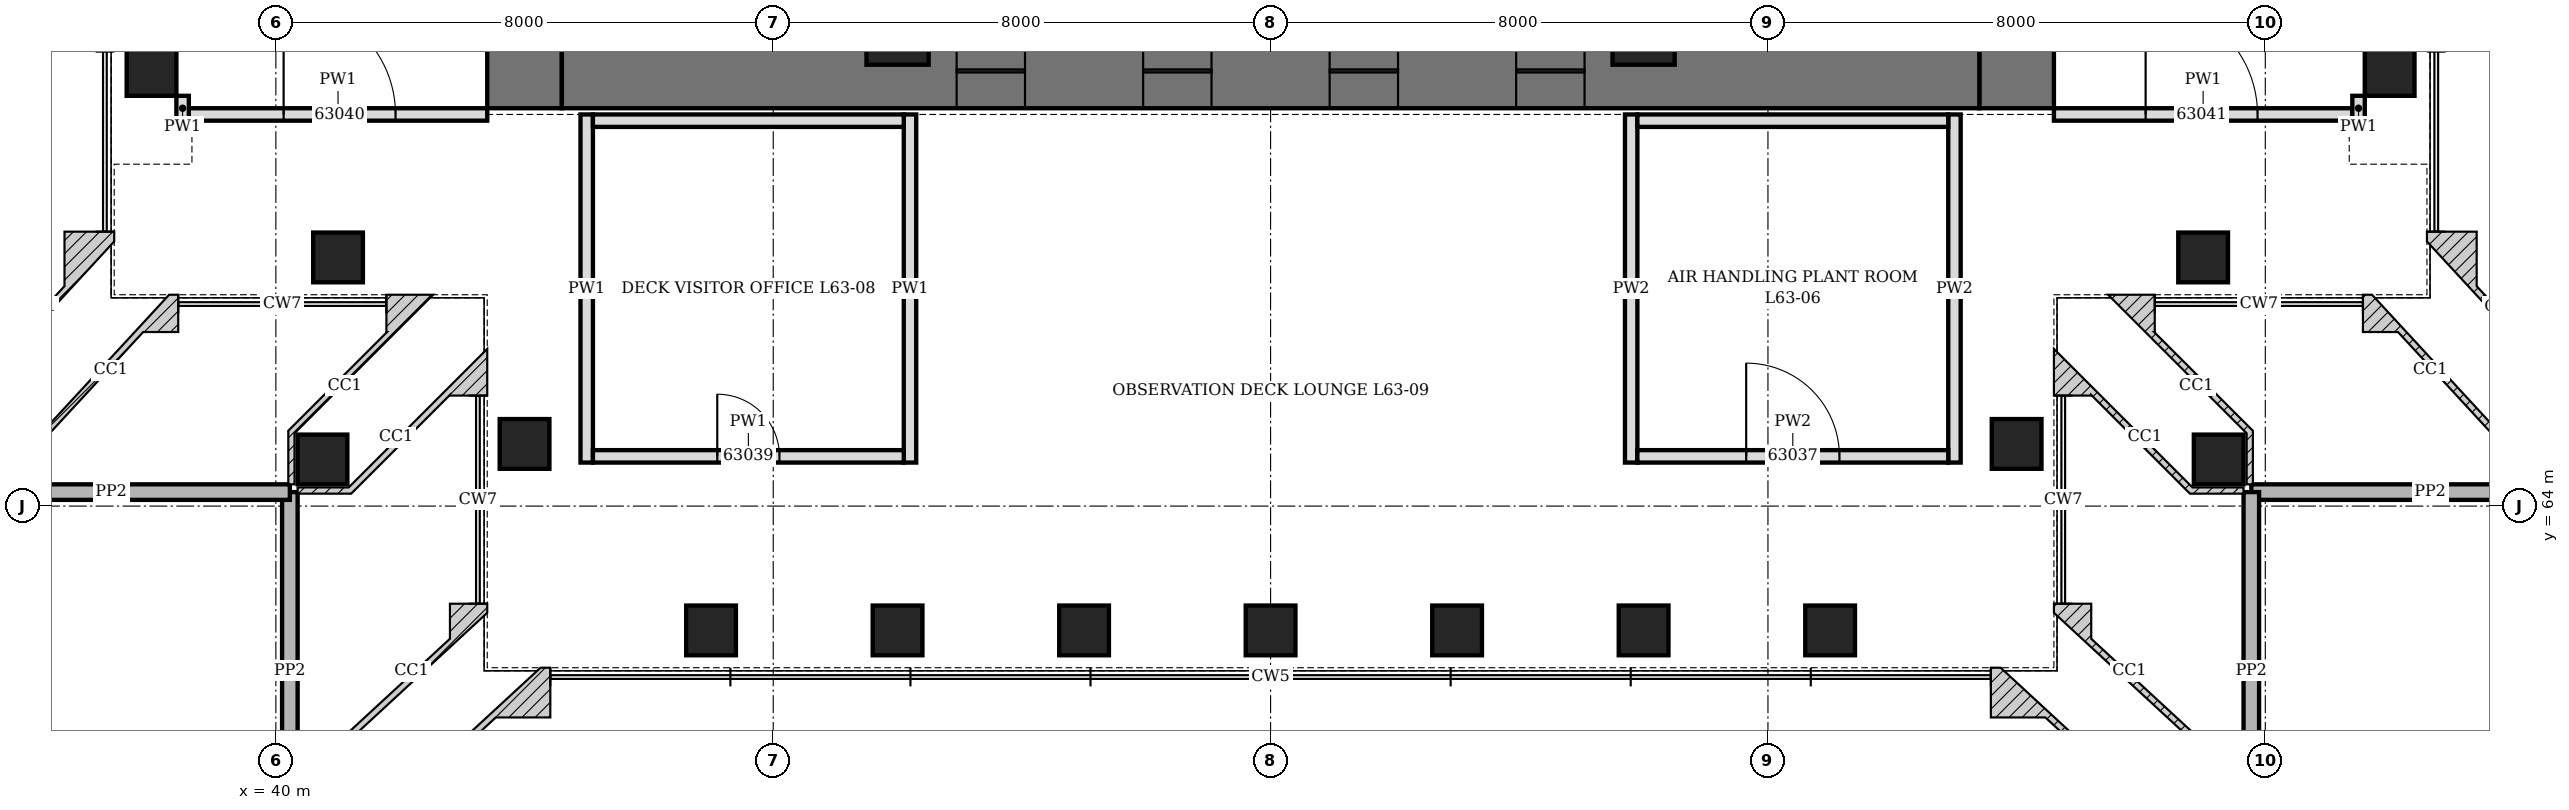
"""IFC4 building model, lengths in metres.
Left out: names, types, materials, properties, quantities, classifications, styles, units other than length and angle.
Written with IfcOpenShell. Run it as: python <this file> out.ifc"""

import sys

from ifc_helpers import new_model, si_unit, direction, frame, frame_2d, origin, origin_2d, place, context, subcontext, project, spatial, rectangle, hollow_rectangle, extrude, clip, halfspace, element, fill, save


model = new_model("IFC4")
c1 = context("Model", 3, precision=1e-05, world=origin(), true_north=direction((0.0, 1.0)))
c2 = subcontext(c1, "Body", "Model", "MODEL_VIEW")
j1 = project(units=[si_unit("LENGTHUNIT", "METRE"), si_unit("PLANEANGLEUNIT", "RADIAN")], contexts=[c1])
p1 = place(None, origin())
s1 = spatial("IfcSite", under=j1, at=p1, CompositionType="ELEMENT")
p2 = place(p1, origin())
s2 = spatial("IfcBuilding", under=s1, at=p2, CompositionType="ELEMENT")
p3 = place(p2, frame((0.0, 0.0, 279.7)))
s3 = spatial("IfcBuildingStorey", under=s2, at=p3, CompositionType="ELEMENT", Elevation=279.7)
p4 = place(p3, frame((40.75, 59.0, -0.25), z_axis=(0.424465046491, 0.391813889069, 0.81627893556), x_axis=(-0.678280102733, 0.734803444627, 0.0)))
e1 = element("IfcColumn", 1, at=p4, inside=s3, PredefinedType="COLUMN", context=c2, shape_type="Clipping", body=[
    clip(clip(extrude(hollow_rectangle(XDim=0.8, YDim=0.8, WallThickness=0.1, at=origin_2d()), origin(), (0.0, 0.0, 1.0), 7.657), halfspace(frame((0.0, 0.0, 0.285), z_axis=(0.0, 0.0, 1.0), x_axis=(1.0, 0.0, 0.0)), True)), halfspace(frame((0.0, 0.0, 7.371), z_axis=(0.0, 0.0, -1.0), x_axis=(1.0, 0.0, 0.0)), True)),
])
for number, where, z_axis, x_axis in (
    (2, (47.0, 62.0, -0.25), (0.0, 0.0, 1.0), (1.0, 0.0, 0.0)),
    (3, (50.0, 62.0, -0.25), (0.0, 0.0, 1.0), (1.0, 0.0, 0.0)),
    (4, (53.0, 62.0, -0.25), (0.0, 0.0, 1.0), (1.0, 0.0, 0.0)),
    (5, (56.0, 62.0, -0.25), (0.0, 0.0, 1.0), (1.0, 0.0, 0.0)),
    (6, (59.0, 62.0, -0.25), (0.0, 0.0, 1.0), (1.0, 0.0, 0.0)),
    (7, (62.0, 62.0, -0.25), (0.0, 0.0, 1.0), (1.0, 0.0, 0.0)),
    (8, (65.0, 62.0, -0.25), (0.0, 0.0, 1.0), (1.0, 0.0, 0.0)),
):
    element("IfcColumn", number, at=place(p3, frame(where, z_axis=z_axis, x_axis=x_axis)), inside=s3, PredefinedType="COLUMN", context=c2, shape_type="SweptSolid", body=[
        extrude(hollow_rectangle(XDim=0.8, YDim=0.8, WallThickness=0.1, at=origin_2d()), origin(), (0.0, 0.0, 1.0), 6.25),
    ])
p5 = place(p3, frame((71.25, 59.0, -0.25), z_axis=(-0.424465046491, 0.391813889069, 0.81627893556), x_axis=(-0.678280102733, -0.734803444627, 0.0)))
e9 = element("IfcColumn", 9, at=p5, inside=s3, PredefinedType="COLUMN", context=c2, shape_type="Clipping", body=[
    clip(clip(extrude(hollow_rectangle(XDim=0.8, YDim=0.8, WallThickness=0.1, at=origin_2d()), origin(), (0.0, 0.0, 1.0), 7.657), halfspace(frame((0.0, 0.0, 0.285), z_axis=(0.0, 0.0, 1.0), x_axis=(1.0, 0.0, 0.0)), True)), halfspace(frame((0.0, 0.0, 7.371), z_axis=(0.0, 0.0, -1.0), x_axis=(1.0, 0.0, 0.0)), True)),
])
p6 = place(p3, frame((68.0, 65.0, -0.25), z_axis=(0.0, 0.0, 1.0), x_axis=(0.0, 1.0, 0.0)))
e10 = element("IfcColumn", 10, at=p6, inside=s3, PredefinedType="COLUMN", context=c2, shape_type="SweptSolid", body=[
    extrude(hollow_rectangle(XDim=0.8, YDim=0.8, WallThickness=0.1, at=origin_2d()), origin(), (0.0, 0.0, 1.0), 6.25),
])
p7 = place(p3, frame((71.25, 64.75, -0.25), z_axis=(-0.418919145253, 0.418919145253, 0.805613740871), x_axis=(-0.707106781187, -0.707106781187, 0.0)))
e11 = element("IfcColumn", 11, at=p7, inside=s3, PredefinedType="COLUMN", context=c2, shape_type="Clipping", body=[
    clip(clip(extrude(hollow_rectangle(XDim=0.8, YDim=0.8, WallThickness=0.1, at=origin_2d()), origin(), (0.0, 0.0, 1.0), 7.758), halfspace(frame((0.0, 0.0, 0.297), z_axis=(0.0, 0.0, 1.0), x_axis=(1.0, 0.0, 0.0)), True)), halfspace(frame((0.0, 0.0, 7.461), z_axis=(0.0, 0.0, -1.0), x_axis=(1.0, 0.0, 0.0)), True)),
])
p8 = place(p3, frame((71.0, 68.0, -0.25), z_axis=(0.0, 0.0, 1.0), x_axis=(1.0, 0.0, 0.0)))
e12 = element("IfcColumn", 12, at=p8, inside=s3, PredefinedType="COLUMN", context=c2, shape_type="SweptSolid", body=[
    extrude(hollow_rectangle(XDim=0.8, YDim=0.8, WallThickness=0.1, at=origin_2d()), origin(), (0.0, 0.0, 1.0), 6.25),
])
p9 = place(p3, frame((77.0, 64.75, -0.25), z_axis=(-0.391813889069, 0.424465046491, 0.81627893556), x_axis=(-0.734803444627, -0.678280102733, 0.0)))
e13 = element("IfcColumn", 13, at=p9, inside=s3, PredefinedType="COLUMN", context=c2, shape_type="Clipping", body=[
    clip(clip(extrude(hollow_rectangle(XDim=0.8, YDim=0.8, WallThickness=0.1, at=origin_2d()), origin(), (0.0, 0.0, 1.0), 7.657), halfspace(frame((0.0, 0.0, 0.285), z_axis=(0.0, 0.0, 1.0), x_axis=(1.0, 0.0, 0.0)), True)), halfspace(frame((0.0, 0.0, 7.371), z_axis=(0.0, 0.0, -1.0), x_axis=(1.0, 0.0, 0.0)), True)),
])
for number, where, z_axis, x_axis in (
    (14, (74.0, 71.0, -0.25), (0.0, 0.0, 1.0), (0.0, 1.0, 0.0)),
    (15, (38.0, 71.0, -0.25), (0.0, 0.0, 1.0), (0.0, 1.0, 0.0)),
):
    element("IfcColumn", number, at=place(p3, frame(where, z_axis=z_axis, x_axis=x_axis)), inside=s3, PredefinedType="COLUMN", context=c2, shape_type="SweptSolid", body=[
        extrude(hollow_rectangle(XDim=0.8, YDim=0.8, WallThickness=0.1, at=origin_2d()), origin(), (0.0, 0.0, 1.0), 6.25),
    ])
p10 = place(p3, frame((35.0, 64.75, -0.25), z_axis=(0.391813889069, 0.424465046491, 0.81627893556), x_axis=(-0.734803444627, 0.678280102733, 0.0)))
e16 = element("IfcColumn", 16, at=p10, inside=s3, PredefinedType="COLUMN", context=c2, shape_type="Clipping", body=[
    clip(clip(extrude(hollow_rectangle(XDim=0.8, YDim=0.8, WallThickness=0.1, at=origin_2d()), origin(), (0.0, 0.0, 1.0), 7.657), halfspace(frame((0.0, 0.0, 0.285), z_axis=(0.0, 0.0, 1.0), x_axis=(1.0, 0.0, 0.0)), True)), halfspace(frame((0.0, 0.0, 7.371), z_axis=(0.0, 0.0, -1.0), x_axis=(1.0, 0.0, 0.0)), True)),
])
p11 = place(p3, frame((41.0, 68.0, -0.25), z_axis=(0.0, 0.0, 1.0), x_axis=(1.0, 0.0, 0.0)))
e17 = element("IfcColumn", 17, at=p11, inside=s3, PredefinedType="COLUMN", context=c2, shape_type="SweptSolid", body=[
    extrude(hollow_rectangle(XDim=0.8, YDim=0.8, WallThickness=0.1, at=origin_2d()), origin(), (0.0, 0.0, 1.0), 6.25),
])
p12 = place(p3, frame((40.75, 64.75, -0.25), z_axis=(0.418919145253, 0.418919145253, 0.805613740871), x_axis=(-0.707106781187, 0.707106781187, 0.0)))
e18 = element("IfcColumn", 18, at=p12, inside=s3, PredefinedType="COLUMN", context=c2, shape_type="Clipping", body=[
    clip(clip(extrude(hollow_rectangle(XDim=0.8, YDim=0.8, WallThickness=0.1, at=origin_2d()), origin(), (0.0, 0.0, 1.0), 7.758), halfspace(frame((0.0, 0.0, 0.297), z_axis=(0.0, 0.0, 1.0), x_axis=(1.0, 0.0, 0.0)), True)), halfspace(frame((0.0, 0.0, 7.461), z_axis=(0.0, 0.0, -1.0), x_axis=(1.0, 0.0, 0.0)), True)),
])
p13 = place(p3, frame((44.0, 65.0, -0.25), z_axis=(0.0, 0.0, 1.0), x_axis=(0.0, 1.0, 0.0)))
e19 = element("IfcColumn", 19, at=p13, inside=s3, PredefinedType="COLUMN", context=c2, shape_type="SweptSolid", body=[
    extrude(hollow_rectangle(XDim=0.8, YDim=0.8, WallThickness=0.1, at=origin_2d()), origin(), (0.0, 0.0, 1.0), 6.25),
])
p14 = place(p3, frame((44.0, 70.4, 0.0), z_axis=(0.0, 0.0, 1.0), x_axis=(0.0, 1.0, 0.0)))
e20 = element("IfcWall", 20, at=p14, inside=s3, PredefinedType="SHEAR", context=c2, shape_type="SweptSolid", body=[
    extrude(rectangle(XDim=19.2, YDim=1.2, at=frame_2d((9.6, 0.0))), origin(), (0.0, 0.0, 1.0), 6.0),
])
p15 = place(p14, frame((8.6, 0.0, 0.0)))
e21 = element("IfcOpeningElement", 21, at=p15, cuts=e20, PredefinedType="OPENING", context=c2, shape_type="SweptSolid", body=[
    extrude(rectangle(XDim=2.0, YDim=2.4, at=frame_2d((1.0, 1.2))), frame((0.0, 0.61, 0.0), z_axis=(0.0, -1.0, 0.0), x_axis=(1.0, 0.0, 0.0)), (0.0, 0.0, 1.0), 1.22),
])
p16 = place(p3, frame((68.0, 70.4, 0.0), z_axis=(0.0, 0.0, 1.0), x_axis=(0.0, 1.0, 0.0)))
e22 = element("IfcWall", 22, at=p16, inside=s3, PredefinedType="SHEAR", context=c2, shape_type="SweptSolid", body=[
    extrude(rectangle(XDim=19.2, YDim=1.2, at=frame_2d((9.6, 0.0))), origin(), (0.0, 0.0, 1.0), 6.0),
])
p17 = place(p16, frame((8.6, 0.0, 0.0)))
e23 = element("IfcOpeningElement", 23, at=p17, cuts=e22, PredefinedType="OPENING", context=c2, shape_type="SweptSolid", body=[
    extrude(rectangle(XDim=2.0, YDim=2.4, at=frame_2d((1.0, 1.2))), frame((0.0, 0.61, 0.0), z_axis=(0.0, -1.0, 0.0), x_axis=(1.0, 0.0, 0.0)), (0.0, 0.0, 1.0), 1.22),
])
p18 = place(p3, frame((44.6, 71.0, 0.0), z_axis=(0.0, 0.0, 1.0), x_axis=(1.0, 0.0, 0.0)))
e24 = element("IfcWall", 24, at=p18, inside=s3, PredefinedType="SHEAR", context=c2, shape_type="SweptSolid", body=[
    extrude(rectangle(XDim=22.8, YDim=1.2, at=frame_2d((11.4, 0.0))), origin(), (0.0, 0.0, 1.0), 6.0),
])
p19 = place(p18, frame((6.35, 0.0, 0.0)))
e25 = element("IfcOpeningElement", 25, at=p19, cuts=e24, PredefinedType="OPENING", context=c2, shape_type="SweptSolid", body=[
    extrude(rectangle(XDim=1.1, YDim=2.2, at=frame_2d((0.55, 1.1))), frame((0.0, 0.61, 0.0), z_axis=(0.0, -1.0, 0.0), x_axis=(1.0, 0.0, 0.0)), (0.0, 0.0, 1.0), 1.22),
])
p20 = place(p18, frame((9.35, 0.0, 0.0)))
e26 = element("IfcOpeningElement", 26, at=p20, cuts=e24, PredefinedType="OPENING", context=c2, shape_type="SweptSolid", body=[
    extrude(rectangle(XDim=1.1, YDim=2.2, at=frame_2d((0.55, 1.1))), frame((0.0, 0.61, 0.0), z_axis=(0.0, -1.0, 0.0), x_axis=(1.0, 0.0, 0.0)), (0.0, 0.0, 1.0), 1.22),
])
p21 = place(p18, frame((12.35, 0.0, 0.0)))
e27 = element("IfcOpeningElement", 27, at=p21, cuts=e24, PredefinedType="OPENING", context=c2, shape_type="SweptSolid", body=[
    extrude(rectangle(XDim=1.1, YDim=2.2, at=frame_2d((0.55, 1.1))), frame((0.0, 0.61, 0.0), z_axis=(0.0, -1.0, 0.0), x_axis=(1.0, 0.0, 0.0)), (0.0, 0.0, 1.0), 1.22),
])
p22 = place(p18, frame((15.35, 0.0, 0.0)))
e28 = element("IfcOpeningElement", 28, at=p22, cuts=e24, PredefinedType="OPENING", context=c2, shape_type="SweptSolid", body=[
    extrude(rectangle(XDim=1.1, YDim=2.2, at=frame_2d((0.55, 1.1))), frame((0.0, 0.61, 0.0), z_axis=(0.0, -1.0, 0.0), x_axis=(1.0, 0.0, 0.0)), (0.0, 0.0, 1.0), 1.22),
])
for number, where, z_axis, x_axis in (
    (29, (50.0, 71.6, 0.0), (0.0, 0.0, 1.0), (1.0, 0.0, 0.0)),
    (30, (62.0, 71.6, 0.0), (0.0, 0.0, 1.0), (1.0, 0.0, 0.0)),
):
    element("IfcColumn", number, at=place(p3, frame(where, z_axis=z_axis, x_axis=x_axis)), inside=s3, PredefinedType="COLUMN", context=c2, shape_type="SweptSolid", body=[
        extrude(hollow_rectangle(XDim=1.0, YDim=1.0, WallThickness=0.15, at=origin_2d()), origin(), (0.0, 0.0, 1.0), 6.0),
    ])
for number, where, z_axis, x_axis in (
    (31, (40.225, 58.475, 0.0), (0.0, 0.0, 1.0), (0.0, 1.0, 0.0)),
    (32, (40.225, 64.225, 0.0), (0.0, 0.0, 1.0), (-1.0, 0.0, 0.0)),
    (33, (77.525, 64.225, 0.0), (0.0, 0.0, 1.0), (-1.0, 0.0, 0.0)),
    (34, (71.775, 64.225, 0.0), (0.0, 0.0, 1.0), (0.0, -1.0, 0.0)),
):
    element("IfcWall", number, at=place(p3, frame(where, z_axis=z_axis, x_axis=x_axis)), inside=s3, PredefinedType="PARAPET", context=c2, shape_type="SweptSolid", body=[
        extrude(rectangle(XDim=5.75, YDim=0.25, at=frame_2d((2.875, 0.0))), origin(), (0.0, 0.0, 1.0), 1.1),
    ])
for number, where, z_axis, x_axis in (
    (35, (61.8, 64.7, 0.0), (0.0, 0.0, 1.0), (0.0, 1.0, 0.0)),
    (36, (67.0, 64.7, 0.0), (0.0, 0.0, 1.0), (0.0, 1.0, 0.0)),
):
    element("IfcWall", number, at=place(p3, frame(where, z_axis=z_axis, x_axis=x_axis)), inside=s3, PredefinedType="PARTITIONING", context=c2, shape_type="SweptSolid", body=[
        extrude(rectangle(XDim=5.6, YDim=0.2, at=frame_2d((2.8, 0.0))), origin(), (0.0, 0.0, 1.0), 5.75),
    ])
p23 = place(p3, frame((61.9, 64.8, 0.0), z_axis=(0.0, 0.0, 1.0), x_axis=(1.0, 0.0, 0.0)))
e37 = element("IfcWall", 37, at=p23, inside=s3, PredefinedType="PARTITIONING", context=c2, shape_type="SweptSolid", body=[
    extrude(rectangle(XDim=5.0, YDim=0.2, at=frame_2d((2.5, 0.0))), origin(), (0.0, 0.0, 1.0), 5.75),
])
p24 = place(p23, frame((1.75, 0.0, 0.0)))
e38 = element("IfcOpeningElement", 38, at=p24, cuts=e37, PredefinedType="OPENING", context=c2, shape_type="SweptSolid", body=[
    extrude(rectangle(XDim=1.5, YDim=2.4, at=frame_2d((0.75, 1.2))), frame((0.0, 0.11, 0.0), z_axis=(0.0, -1.0, 0.0), x_axis=(1.0, 0.0, 0.0)), (0.0, 0.0, 1.0), 0.22),
])
p25 = place(p3, frame((61.9, 70.2, 0.0), z_axis=(0.0, 0.0, 1.0), x_axis=(1.0, 0.0, 0.0)))
e39 = element("IfcWall", 39, at=p25, inside=s3, PredefinedType="PARTITIONING", context=c2, shape_type="SweptSolid", body=[
    extrude(rectangle(XDim=5.0, YDim=0.2, at=frame_2d((2.5, 0.0))), origin(), (0.0, 0.0, 1.0), 5.75),
])
for number, where, z_axis, x_axis in (
    (40, (45.0, 64.7, 0.0), (0.0, 0.0, 1.0), (0.0, 1.0, 0.0)),
    (41, (50.2, 64.7, 0.0), (0.0, 0.0, 1.0), (0.0, 1.0, 0.0)),
):
    element("IfcWall", number, at=place(p3, frame(where, z_axis=z_axis, x_axis=x_axis)), inside=s3, PredefinedType="PARTITIONING", context=c2, shape_type="SweptSolid", body=[
        extrude(rectangle(XDim=5.6, YDim=0.2, at=frame_2d((2.8, 0.0))), origin(), (0.0, 0.0, 1.0), 5.75),
    ])
p26 = place(p3, frame((45.1, 64.8, 0.0), z_axis=(0.0, 0.0, 1.0), x_axis=(1.0, 0.0, 0.0)))
e42 = element("IfcWall", 42, at=p26, inside=s3, PredefinedType="PARTITIONING", context=c2, shape_type="SweptSolid", body=[
    extrude(rectangle(XDim=5.0, YDim=0.2, at=frame_2d((2.5, 0.0))), origin(), (0.0, 0.0, 1.0), 5.75),
])
p27 = place(p26, frame((2.0, 0.0, 0.0)))
e43 = element("IfcOpeningElement", 43, at=p27, cuts=e42, PredefinedType="OPENING", context=c2, shape_type="SweptSolid", body=[
    extrude(rectangle(XDim=1.0, YDim=2.1, at=frame_2d((0.5, 1.05))), frame((0.0, 0.11, 0.0), z_axis=(0.0, -1.0, 0.0), x_axis=(1.0, 0.0, 0.0)), (0.0, 0.0, 1.0), 0.22),
])
p28 = place(p3, frame((45.1, 70.2, 0.0), z_axis=(0.0, 0.0, 1.0), x_axis=(1.0, 0.0, 0.0)))
e44 = element("IfcWall", 44, at=p28, inside=s3, PredefinedType="PARTITIONING", context=c2, shape_type="SweptSolid", body=[
    extrude(rectangle(XDim=5.0, YDim=0.2, at=frame_2d((2.5, 0.0))), origin(), (0.0, 0.0, 1.0), 5.75),
])
p29 = place(p3, frame((38.6, 70.3, 0.0), z_axis=(0.0, 0.0, 1.0), x_axis=(1.0, 0.0, 0.0)))
e45 = element("IfcWall", 45, at=p29, inside=s3, PredefinedType="PARTITIONING", context=c2, shape_type="SweptSolid", body=[
    extrude(rectangle(XDim=4.8, YDim=0.2, at=frame_2d((2.4, 0.0))), origin(), (0.0, 0.0, 1.0), 5.75),
])
p30 = place(p29, frame((1.525, 0.0, 0.0)))
e46 = element("IfcOpeningElement", 46, at=p30, cuts=e45, PredefinedType="OPENING", context=c2, shape_type="SweptSolid", body=[
    extrude(rectangle(XDim=1.8, YDim=2.4, at=frame_2d((0.9, 1.2))), frame((0.0, 0.11, 0.0), z_axis=(0.0, -1.0, 0.0), x_axis=(1.0, 0.0, 0.0)), (0.0, 0.0, 1.0), 0.22),
])
p31 = place(p3, frame((38.5, 70.2, 0.0), z_axis=(0.0, 0.0, 1.0), x_axis=(0.0, 1.0, 0.0)))
e47 = element("IfcWall", 47, at=p31, inside=s3, PredefinedType="PARTITIONING", context=c2, shape_type="SweptSolid", body=[
    extrude(rectangle(XDim=0.4, YDim=0.2, at=frame_2d((0.2, 0.0))), origin(), (0.0, 0.0, 1.0), 5.75),
])
p32 = place(p3, frame((68.6, 70.3, 0.0), z_axis=(0.0, 0.0, 1.0), x_axis=(1.0, 0.0, 0.0)))
e48 = element("IfcWall", 48, at=p32, inside=s3, PredefinedType="PARTITIONING", context=c2, shape_type="SweptSolid", body=[
    extrude(rectangle(XDim=4.8, YDim=0.2, at=frame_2d((2.4, 0.0))), origin(), (0.0, 0.0, 1.0), 5.75),
])
p33 = place(p32, frame((1.475, 0.0, 0.0)))
e49 = element("IfcOpeningElement", 49, at=p33, cuts=e48, PredefinedType="OPENING", context=c2, shape_type="SweptSolid", body=[
    extrude(rectangle(XDim=1.8, YDim=2.4, at=frame_2d((0.9, 1.2))), frame((0.0, 0.11, 0.0), z_axis=(0.0, -1.0, 0.0), x_axis=(1.0, 0.0, 0.0)), (0.0, 0.0, 1.0), 0.22),
])
p34 = place(p3, frame((73.5, 70.2, 0.0), z_axis=(0.0, 0.0, 1.0), x_axis=(0.0, 1.0, 0.0)))
e50 = element("IfcWall", 50, at=p34, inside=s3, PredefinedType="PARTITIONING", context=c2, shape_type="SweptSolid", body=[
    extrude(rectangle(XDim=0.4, YDim=0.2, at=frame_2d((0.2, 0.0))), origin(), (0.0, 0.0, 1.0), 5.75),
])
p35 = place(p19, origin())
e51 = element("IfcDoor", 51, at=p35, inside=s3, OperationType="SLIDING_TO_LEFT", PredefinedType="DOOR", context=c2, shape_type="SweptSolid", body=[
    extrude(rectangle(XDim=1.1, YDim=2.2, at=frame_2d((0.55, 1.1))), frame((0.0, 0.35, 0.0), z_axis=(0.0, -1.0, 0.0), x_axis=(1.0, 0.0, 0.0)), (0.0, 0.0, 1.0), 0.7),
])
fill(e25, e51)
p36 = place(p20, origin())
e52 = element("IfcDoor", 52, at=p36, inside=s3, OperationType="SLIDING_TO_LEFT", PredefinedType="DOOR", context=c2, shape_type="SweptSolid", body=[
    extrude(rectangle(XDim=1.1, YDim=2.2, at=frame_2d((0.55, 1.1))), frame((0.0, 0.35, 0.0), z_axis=(0.0, -1.0, 0.0), x_axis=(1.0, 0.0, 0.0)), (0.0, 0.0, 1.0), 0.7),
])
fill(e26, e52)
p37 = place(p21, origin())
e53 = element("IfcDoor", 53, at=p37, inside=s3, OperationType="SLIDING_TO_LEFT", PredefinedType="DOOR", context=c2, shape_type="SweptSolid", body=[
    extrude(rectangle(XDim=1.1, YDim=2.2, at=frame_2d((0.55, 1.1))), frame((0.0, 0.35, 0.0), z_axis=(0.0, -1.0, 0.0), x_axis=(1.0, 0.0, 0.0)), (0.0, 0.0, 1.0), 0.7),
])
fill(e27, e53)
p38 = place(p22, origin())
e54 = element("IfcDoor", 54, at=p38, inside=s3, OperationType="SLIDING_TO_LEFT", PredefinedType="DOOR", context=c2, shape_type="SweptSolid", body=[
    extrude(rectangle(XDim=1.1, YDim=2.2, at=frame_2d((0.55, 1.1))), frame((0.0, 0.35, 0.0), z_axis=(0.0, -1.0, 0.0), x_axis=(1.0, 0.0, 0.0)), (0.0, 0.0, 1.0), 0.7),
])
fill(e28, e54)
p39 = place(p24, origin())
e55 = element("IfcDoor", 55, at=p39, inside=s3, OperationType="DOUBLE_DOOR_SINGLE_SWING", PredefinedType="DOOR", context=c2, shape_type="SweptSolid", body=[
    extrude(rectangle(XDim=1.5, YDim=2.4, at=frame_2d((0.75, 1.2))), frame((0.0, 0.1, 0.0), z_axis=(0.0, -1.0, 0.0), x_axis=(1.0, 0.0, 0.0)), (0.0, 0.0, 1.0), 0.199),
])
fill(e38, e55)
p40 = place(p27, origin())
e56 = element("IfcDoor", 56, at=p40, inside=s3, OperationType="SINGLE_SWING_LEFT", PredefinedType="DOOR", context=c2, shape_type="SweptSolid", body=[
    extrude(rectangle(XDim=1.0, YDim=2.1, at=frame_2d((0.5, 1.05))), frame((0.0, 0.1, 0.0), z_axis=(0.0, -1.0, 0.0), x_axis=(1.0, 0.0, 0.0)), (0.0, 0.0, 1.0), 0.199),
])
fill(e43, e56)
p41 = place(p30, origin())
e57 = element("IfcDoor", 57, at=p41, inside=s3, OperationType="DOUBLE_DOOR_DOUBLE_SWING", PredefinedType="DOOR", context=c2, shape_type="SweptSolid", body=[
    extrude(rectangle(XDim=1.8, YDim=2.4, at=frame_2d((0.9, 1.2))), frame((0.0, 0.1, 0.0), z_axis=(0.0, -1.0, 0.0), x_axis=(1.0, 0.0, 0.0)), (0.0, 0.0, 1.0), 0.199),
])
fill(e46, e57)
p42 = place(p33, origin())
e58 = element("IfcDoor", 58, at=p42, inside=s3, OperationType="DOUBLE_DOOR_DOUBLE_SWING", PredefinedType="DOOR", context=c2, shape_type="SweptSolid", body=[
    extrude(rectangle(XDim=1.8, YDim=2.4, at=frame_2d((0.9, 1.2))), frame((0.0, 0.1, 0.0), z_axis=(0.0, -1.0, 0.0), x_axis=(1.0, 0.0, 0.0)), (0.0, 0.0, 1.0), 0.199),
])
fill(e49, e58)
save(model, sys.argv[1])
